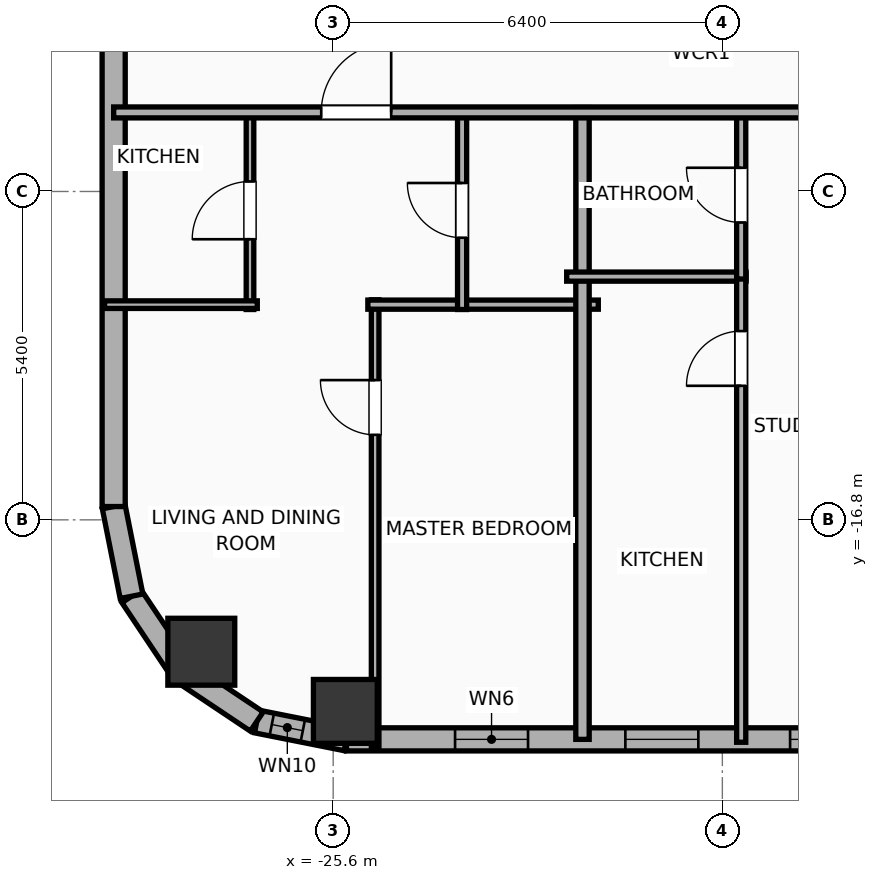
"""IFC4 building model, lengths in metres.
Left out: names, types, materials, properties, quantities, classifications, styles, units other than length and angle.
Written with IfcOpenShell. Run it as: python <this file> out.ifc"""

import sys

from ifc_helpers import new_model, si_unit, direction, frame, frame_2d, origin, origin_2d, place, context, subcontext, project, spatial, rectangle, hollow_rectangle, hollow_circle, extrude, element, fill, save


model = new_model("IFC4")
c1 = context("Model", 3, precision=1e-05, world=origin(), true_north=direction((0.0, 1.0)))
c2 = subcontext(c1, "Body", "Model", "MODEL_VIEW")
j1 = project(units=[si_unit("LENGTHUNIT", "METRE"), si_unit("PLANEANGLEUNIT", "RADIAN")], contexts=[c1])
p1 = place(None, origin())
s1 = spatial("IfcSite", under=j1, at=p1, CompositionType="ELEMENT")
p2 = place(p1, origin())
s2 = spatial("IfcBuilding", under=s1, at=p2, CompositionType="ELEMENT")
p3 = place(p2, frame((0.0, 0.0, 128.7)))
s3 = spatial("IfcBuildingStorey", under=s2, at=p3, CompositionType="ELEMENT", Elevation=128.7)
p4 = place(p3, frame((-25.4, -19.95, 0.0), z_axis=(0.0, 0.0, 1.0), x_axis=(1.0, 0.0, 0.0)))
e1 = element("IfcColumn", 1, at=p4, inside=s3, PredefinedType="COLUMN", context=c2, shape_type="SweptSolid", body=[
    extrude(hollow_rectangle(XDim=1.05, YDim=1.05, WallThickness=0.036, at=origin_2d()), origin(), (0.0, 0.0, 1.0), 3.9),
])
p5 = place(p3, frame((-27.769, -18.969, 0.0), z_axis=(0.0, 0.0, 1.0), x_axis=(1.0, 0.0, 0.0)))
e2 = element("IfcColumn", 2, at=p5, inside=s3, PredefinedType="COLUMN", context=c2, shape_type="SweptSolid", body=[
    extrude(hollow_circle(Radius=0.55, WallThickness=0.036, at=origin_2d()), origin(), (0.0, 0.0, 1.0), 3.9),
])
p6 = place(p3, frame((29.381, -20.41, 0.0), z_axis=(0.0, 0.0, 1.0), x_axis=(-1.0, 0.0, 0.0)))
e3 = element("IfcWall", 3, at=p6, inside=s3, PredefinedType="ELEMENTEDWALL", context=c2, shape_type="SweptSolid", body=[
    extrude(rectangle(XDim=54.763, YDim=0.38, at=frame_2d((27.381, 0.0))), origin(), (0.0, 0.0, 1.0), 3.65),
])
p7 = place(p6, frame((45.067, 0.0, 0.75)))
e4 = element("IfcOpeningElement", 4, at=p7, cuts=e3, PredefinedType="OPENING", context=c2, shape_type="SweptSolid", body=[
    extrude(rectangle(XDim=2.4, YDim=2.1, at=frame_2d((1.2, 1.05))), frame((0.0, 0.2, 0.0), z_axis=(0.0, -1.0, 0.0), x_axis=(1.0, 0.0, 0.0)), (0.0, 0.0, 1.0), 0.4),
])
p8 = place(p6, frame((51.777, 0.0, 0.75)))
e5 = element("IfcOpeningElement", 5, at=p8, cuts=e3, PredefinedType="OPENING", context=c2, shape_type="SweptSolid", body=[
    extrude(rectangle(XDim=1.2, YDim=2.05, at=frame_2d((0.6, 1.025))), frame((0.0, 0.2, 0.0), z_axis=(0.0, -1.0, 0.0), x_axis=(1.0, 0.0, 0.0)), (0.0, 0.0, 1.0), 0.4),
])
p9 = place(p6, frame((48.976, 0.0, 0.75)))
e6 = element("IfcOpeningElement", 6, at=p9, cuts=e3, PredefinedType="OPENING", context=c2, shape_type="SweptSolid", body=[
    extrude(rectangle(XDim=1.2, YDim=2.05, at=frame_2d((0.6, 1.025))), frame((0.0, 0.2, 0.0), z_axis=(0.0, -1.0, 0.0), x_axis=(1.0, 0.0, 0.0)), (0.0, 0.0, 1.0), 0.4),
])
p10 = place(p6, frame((40.531, 0.0, 0.75)))
e7 = element("IfcOpeningElement", 7, at=p10, cuts=e3, PredefinedType="OPENING", context=c2, shape_type="SweptSolid", body=[
    extrude(rectangle(XDim=1.2, YDim=2.05, at=frame_2d((0.6, 1.025))), frame((0.0, 0.2, 0.0), z_axis=(0.0, -1.0, 0.0), x_axis=(1.0, 0.0, 0.0)), (0.0, 0.0, 1.0), 0.4),
])
p11 = place(p6, frame((33.686, 0.0, 0.75)))
e8 = element("IfcOpeningElement", 8, at=p11, cuts=e3, PredefinedType="OPENING", context=c2, shape_type="SweptSolid", body=[
    extrude(rectangle(XDim=1.2, YDim=2.05, at=frame_2d((0.6, 1.025))), frame((0.0, 0.2, 0.0), z_axis=(0.0, -1.0, 0.0), x_axis=(1.0, 0.0, 0.0)), (0.0, 0.0, 1.0), 0.4),
])
p12 = place(p6, frame((35.976, 0.0, 0.75)))
e9 = element("IfcOpeningElement", 9, at=p12, cuts=e3, PredefinedType="OPENING", context=c2, shape_type="SweptSolid", body=[
    extrude(rectangle(XDim=1.2, YDim=2.05, at=frame_2d((0.6, 1.025))), frame((0.0, 0.2, 0.0), z_axis=(0.0, -1.0, 0.0), x_axis=(1.0, 0.0, 0.0)), (0.0, 0.0, 1.0), 0.4),
])
p13 = place(p6, frame((28.805, 0.0, 0.75)))
e10 = element("IfcOpeningElement", 10, at=p13, cuts=e3, PredefinedType="OPENING", context=c2, shape_type="SweptSolid", body=[
    extrude(rectangle(XDim=1.2, YDim=2.05, at=frame_2d((0.6, 1.025))), frame((0.0, 0.2, 0.0), z_axis=(0.0, -1.0, 0.0), x_axis=(1.0, 0.0, 0.0)), (0.0, 0.0, 1.0), 0.4),
])
p14 = place(p6, frame((25.555, 0.0, 0.75)))
e11 = element("IfcOpeningElement", 11, at=p14, cuts=e3, PredefinedType="OPENING", context=c2, shape_type="SweptSolid", body=[
    extrude(rectangle(XDim=1.2, YDim=2.05, at=frame_2d((0.6, 1.025))), frame((0.0, 0.2, 0.0), z_axis=(0.0, -1.0, 0.0), x_axis=(1.0, 0.0, 0.0)), (0.0, 0.0, 1.0), 0.4),
])
p15 = place(p6, frame((19.951, 0.0, 0.75)))
e12 = element("IfcOpeningElement", 12, at=p15, cuts=e3, PredefinedType="OPENING", context=c2, shape_type="SweptSolid", body=[
    extrude(rectangle(XDim=1.2, YDim=2.05, at=frame_2d((0.6, 1.025))), frame((0.0, 0.2, 0.0), z_axis=(0.0, -1.0, 0.0), x_axis=(1.0, 0.0, 0.0)), (0.0, 0.0, 1.0), 0.4),
])
p16 = place(p6, frame((15.836, 0.0, 0.75)))
e13 = element("IfcOpeningElement", 13, at=p16, cuts=e3, PredefinedType="OPENING", context=c2, shape_type="SweptSolid", body=[
    extrude(rectangle(XDim=1.2, YDim=2.05, at=frame_2d((0.6, 1.025))), frame((0.0, 0.2, 0.0), z_axis=(0.0, -1.0, 0.0), x_axis=(1.0, 0.0, 0.0)), (0.0, 0.0, 1.0), 0.4),
])
p17 = place(p6, frame((12.586, 0.0, 0.75)))
e14 = element("IfcOpeningElement", 14, at=p17, cuts=e3, PredefinedType="OPENING", context=c2, shape_type="SweptSolid", body=[
    extrude(rectangle(XDim=1.2, YDim=2.05, at=frame_2d((0.6, 1.025))), frame((0.0, 0.2, 0.0), z_axis=(0.0, -1.0, 0.0), x_axis=(1.0, 0.0, 0.0)), (0.0, 0.0, 1.0), 0.4),
])
p18 = place(p6, frame((9.011, 0.0, 0.75)))
e15 = element("IfcOpeningElement", 15, at=p18, cuts=e3, PredefinedType="OPENING", context=c2, shape_type="SweptSolid", body=[
    extrude(rectangle(XDim=1.2, YDim=2.05, at=frame_2d((0.6, 1.025))), frame((0.0, 0.2, 0.0), z_axis=(0.0, -1.0, 0.0), x_axis=(1.0, 0.0, 0.0)), (0.0, 0.0, 1.0), 0.4),
])
p19 = place(p6, frame((6.001, 0.0, 0.75)))
e16 = element("IfcOpeningElement", 16, at=p19, cuts=e3, PredefinedType="OPENING", context=c2, shape_type="SweptSolid", body=[
    extrude(rectangle(XDim=1.2, YDim=2.05, at=frame_2d((0.6, 1.025))), frame((0.0, 0.2, 0.0), z_axis=(0.0, -1.0, 0.0), x_axis=(1.0, 0.0, 0.0)), (0.0, 0.0, 1.0), 0.4),
])
p20 = place(p6, frame((2.536, 0.0, 0.75)))
e17 = element("IfcOpeningElement", 17, at=p20, cuts=e3, PredefinedType="OPENING", context=c2, shape_type="SweptSolid", body=[
    extrude(rectangle(XDim=1.2, YDim=2.05, at=frame_2d((0.6, 1.025))), frame((0.0, 0.2, 0.0), z_axis=(0.0, -1.0, 0.0), x_axis=(1.0, 0.0, 0.0)), (0.0, 0.0, 1.0), 0.4),
])
p21 = place(p3, frame((-25.381, -20.41, 0.0), z_axis=(0.0, 0.0, 1.0), x_axis=(-0.980786132421, 0.195086038585, 0.0)))
e18 = element("IfcWall", 18, at=p21, inside=s3, PredefinedType="ELEMENTEDWALL", context=c2, shape_type="SweptSolid", body=[
    extrude(rectangle(XDim=1.504, YDim=0.38, at=frame_2d((0.752, 0.0))), origin(), (0.0, 0.0, 1.0), 3.65),
])
p22 = place(p21, frame((0.732, 0.0, 0.75)))
e19 = element("IfcOpeningElement", 19, at=p22, cuts=e18, PredefinedType="OPENING", context=c2, shape_type="SweptSolid", body=[
    extrude(rectangle(XDim=0.52, YDim=2.05, at=frame_2d((0.26, 1.025))), frame((0.0, 0.2, 0.0), z_axis=(0.0, -1.0, 0.0), x_axis=(1.0, 0.0, 0.0)), (0.0, 0.0, 1.0), 0.4),
])
p23 = place(p3, frame((-26.857, -20.116, 0.0), z_axis=(0.0, 0.0, 1.0), x_axis=(-0.831468045563, 0.555572577804, 0.0)))
e20 = element("IfcWall", 20, at=p23, inside=s3, PredefinedType="ELEMENTEDWALL", context=c2, shape_type="SweptSolid", body=[
    extrude(rectangle(XDim=1.485, YDim=0.38, at=frame_2d((0.742, 0.0))), origin(), (0.0, 0.0, 1.0), 3.65),
])
p24 = place(p3, frame((-28.091, -19.292, 0.0), z_axis=(0.0, 0.0, 1.0), x_axis=(-0.555610286119, 0.831442848281, 0.0)))
e21 = element("IfcWall", 21, at=p24, inside=s3, PredefinedType="ELEMENTEDWALL", context=c2, shape_type="SweptSolid", body=[
    extrude(rectangle(XDim=1.485, YDim=0.38, at=frame_2d((0.743, 0.0))), origin(), (0.0, 0.0, 1.0), 3.65),
])
p25 = place(p3, frame((-28.917, -18.057, 0.0), z_axis=(0.0, 0.0, 1.0), x_axis=(-0.195086038585, 0.980786132421, 0.0)))
e22 = element("IfcWall", 22, at=p25, inside=s3, PredefinedType="ELEMENTEDWALL", context=c2, shape_type="SweptSolid", body=[
    extrude(rectangle(XDim=1.504, YDim=0.38, at=frame_2d((0.752, 0.0))), origin(), (0.0, 0.0, 1.0), 3.65),
])
p26 = place(p3, frame((-29.21, -16.581, 0.0), z_axis=(0.0, 0.0, 1.0), x_axis=(0.0, 1.0, 0.0)))
e23 = element("IfcWall", 23, at=p26, inside=s3, PredefinedType="ELEMENTEDWALL", context=c2, shape_type="SweptSolid", body=[
    extrude(rectangle(XDim=34.363, YDim=0.38, at=frame_2d((17.181, 0.0))), origin(), (0.0, 0.0, 1.0), 3.65),
])
p27 = place(p26, frame((31.087, 0.0, 0.75)))
e24 = element("IfcOpeningElement", 24, at=p27, cuts=e23, PredefinedType="OPENING", context=c2, shape_type="SweptSolid", body=[
    extrude(rectangle(XDim=1.2, YDim=2.05, at=frame_2d((0.6, 1.025))), frame((0.0, 0.2, 0.0), z_axis=(0.0, -1.0, 0.0), x_axis=(1.0, 0.0, 0.0)), (0.0, 0.0, 1.0), 0.4),
])
p28 = place(p26, frame((20.326, 0.0, 0.75)))
e25 = element("IfcOpeningElement", 25, at=p28, cuts=e23, PredefinedType="OPENING", context=c2, shape_type="SweptSolid", body=[
    extrude(rectangle(XDim=1.2, YDim=2.05, at=frame_2d((0.6, 1.025))), frame((0.0, 0.2, 0.0), z_axis=(0.0, -1.0, 0.0), x_axis=(1.0, 0.0, 0.0)), (0.0, 0.0, 1.0), 0.4),
])
p29 = place(p26, frame((11.776, 0.0, 0.75)))
e26 = element("IfcOpeningElement", 26, at=p29, cuts=e23, PredefinedType="OPENING", context=c2, shape_type="SweptSolid", body=[
    extrude(rectangle(XDim=1.2, YDim=2.05, at=frame_2d((0.6, 1.025))), frame((0.0, 0.2, 0.0), z_axis=(0.0, -1.0, 0.0), x_axis=(1.0, 0.0, 0.0)), (0.0, 0.0, 1.0), 0.4),
])
p30 = place(p3, frame((-24.91, -20.56, 0.0), z_axis=(0.0, 0.0, 1.0), x_axis=(0.0, 1.0, 0.0)))
e27 = element("IfcWall", 27, at=p30, inside=s3, PredefinedType="PARTITIONING", context=c2, shape_type="SweptSolid", body=[
    extrude(rectangle(XDim=7.379, YDim=0.125, at=frame_2d((3.689, 0.0))), origin(), (0.0, 0.0, 1.0), 3.65),
])
p31 = place(p30, frame((5.158, 0.0, 0.0)))
e28 = element("IfcOpeningElement", 28, at=p31, cuts=e27, PredefinedType="OPENING", context=c2, shape_type="SweptSolid", body=[
    extrude(rectangle(XDim=0.9, YDim=2.05, at=frame_2d((0.45, 1.025))), frame((0.0, 0.073, 0.0), z_axis=(0.0, -1.0, 0.0), x_axis=(1.0, 0.0, 0.0)), (0.0, 0.0, 1.0), 0.145),
])
p32 = place(p3, frame((-25.03, -13.261, 0.0), z_axis=(0.0, 0.0, 1.0), x_axis=(1.0, 0.0, 0.0)))
e29 = element("IfcWall", 29, at=p32, inside=s3, PredefinedType="PLUMBINGWALL", context=c2, shape_type="SweptSolid", body=[
    extrude(rectangle(XDim=3.79, YDim=0.15, at=frame_2d((1.895, 0.0))), origin(), (0.0, 0.0, 1.0), 3.65),
])
p33 = place(p3, frame((-26.968, -13.341, 0.0), z_axis=(0.0, 0.0, 1.0), x_axis=(0.0, 1.0, 0.0)))
e30 = element("IfcWall", 30, at=p33, inside=s3, PredefinedType="PARTITIONING", context=c2, shape_type="SweptSolid", body=[
    extrude(rectangle(XDim=3.261, YDim=0.125, at=frame_2d((1.63, 0.0))), origin(), (0.0, 0.0, 1.0), 3.65),
])
p34 = place(p33, frame((1.156, 0.0, 0.0)))
e31 = element("IfcOpeningElement", 31, at=p34, cuts=e30, PredefinedType="OPENING", context=c2, shape_type="SweptSolid", body=[
    extrude(rectangle(XDim=0.95, YDim=2.05, at=frame_2d((0.475, 1.025))), frame((0.0, 0.073, 0.0), z_axis=(0.0, -1.0, 0.0), x_axis=(1.0, 0.0, 0.0)), (0.0, 0.0, 1.0), 0.145),
])
p35 = place(p3, frame((-29.36, -13.261, 0.0), z_axis=(0.0, 0.0, 1.0), x_axis=(1.0, 0.0, 0.0)))
e32 = element("IfcWall", 32, at=p35, inside=s3, PredefinedType="PARTITIONING", context=c2, shape_type="SweptSolid", body=[
    extrude(rectangle(XDim=2.512, YDim=0.125, at=frame_2d((1.256, 0.0))), origin(), (0.0, 0.0, 1.0), 3.65),
])
p36 = place(p3, frame((-23.48, -13.341, 0.0), z_axis=(0.0, 0.0, 1.0), x_axis=(0.0, 1.0, 0.0)))
e33 = element("IfcWall", 33, at=p36, inside=s3, PredefinedType="PLUMBINGWALL", context=c2, shape_type="SweptSolid", body=[
    extrude(rectangle(XDim=3.261, YDim=0.15, at=frame_2d((1.63, 0.0))), origin(), (0.0, 0.0, 1.0), 3.65),
])
p37 = place(p36, frame((1.18, 0.0, 0.0)))
e34 = element("IfcOpeningElement", 34, at=p37, cuts=e33, PredefinedType="OPENING", context=c2, shape_type="SweptSolid", body=[
    extrude(rectangle(XDim=0.9, YDim=2.05, at=frame_2d((0.45, 1.025))), frame((0.0, 0.085, 0.0), z_axis=(0.0, -1.0, 0.0), x_axis=(1.0, 0.0, 0.0)), (0.0, 0.0, 1.0), 0.17),
])
p38 = place(p3, frame((-21.5, -20.41, 0.0), z_axis=(0.0, 0.0, 1.0), x_axis=(0.0, 1.0, 0.0)))
e35 = element("IfcWall", 35, at=p38, inside=s3, PredefinedType="PARTITIONING", context=c2, shape_type="SweptSolid", body=[
    extrude(rectangle(XDim=10.39, YDim=0.22, at=frame_2d((5.195, 0.0))), origin(), (0.0, 0.0, 1.0), 3.65),
])
p39 = place(p3, frame((-21.76, -12.8, 0.0), z_axis=(0.0, 0.0, 1.0), x_axis=(1.0, 0.0, 0.0)))
e36 = element("IfcWall", 36, at=p39, inside=s3, PredefinedType="PLUMBINGWALL", context=c2, shape_type="SweptSolid", body=[
    extrude(rectangle(XDim=2.95, YDim=0.15, at=frame_2d((1.475, 0.0))), origin(), (0.0, 0.0, 1.0), 3.65),
])
p40 = place(p3, frame((-18.89, -20.458, 0.0), z_axis=(0.0, 0.0, 1.0), x_axis=(0.0, 1.0, 0.0)))
e37 = element("IfcWall", 37, at=p40, inside=s3, PredefinedType="PLUMBINGWALL", context=c2, shape_type="SweptSolid", body=[
    extrude(rectangle(XDim=7.698, YDim=0.15, at=frame_2d((3.849, 0.0))), origin(), (0.0, 0.0, 1.0), 3.65),
])
p41 = place(p40, frame((5.862, 0.0, 0.0)))
e38 = element("IfcOpeningElement", 38, at=p41, cuts=e37, PredefinedType="OPENING", context=c2, shape_type="SweptSolid", body=[
    extrude(rectangle(XDim=0.9, YDim=2.05, at=frame_2d((0.45, 1.025))), frame((0.0, 0.085, 0.0), z_axis=(0.0, -1.0, 0.0), x_axis=(1.0, 0.0, 0.0)), (0.0, 0.0, 1.0), 0.17),
])
p42 = place(p3, frame((-18.89, -12.84, 0.0), z_axis=(0.0, 0.0, 1.0), x_axis=(0.0, 1.0, 0.0)))
e39 = element("IfcWall", 39, at=p42, inside=s3, PredefinedType="PLUMBINGWALL", context=c2, shape_type="SweptSolid", body=[
    extrude(rectangle(XDim=2.76, YDim=0.15, at=frame_2d((1.38, 0.0))), origin(), (0.0, 0.0, 1.0), 3.65),
])
p43 = place(p42, frame((0.93, 0.0, 0.0)))
e40 = element("IfcOpeningElement", 40, at=p43, cuts=e39, PredefinedType="OPENING", context=c2, shape_type="SweptSolid", body=[
    extrude(rectangle(XDim=0.9, YDim=2.05, at=frame_2d((0.45, 1.025))), frame((0.0, 0.085, 0.0), z_axis=(0.0, -1.0, 0.0), x_axis=(1.0, 0.0, 0.0)), (0.0, 0.0, 1.0), 0.17),
])
p44 = place(p3, frame((-29.21, -10.1, 0.0), z_axis=(0.0, 0.0, 1.0), x_axis=(1.0, 0.0, 0.0)))
e41 = element("IfcWall", 41, at=p44, inside=s3, PredefinedType="PARTITIONING", context=c2, shape_type="SweptSolid", body=[
    extrude(rectangle(XDim=62.42, YDim=0.18, at=frame_2d((31.21, 0.0))), origin(), (0.0, 0.0, 1.0), 3.65),
])
p45 = place(p44, frame((3.414, 0.0, 0.0)))
e42 = element("IfcOpeningElement", 42, at=p45, cuts=e41, PredefinedType="OPENING", context=c2, shape_type="SweptSolid", body=[
    extrude(rectangle(XDim=1.15, YDim=2.05, at=frame_2d((0.575, 1.025))), frame((0.0, 0.1, 0.0), z_axis=(0.0, -1.0, 0.0), x_axis=(1.0, 0.0, 0.0)), (0.0, 0.0, 1.0), 0.2),
])
p46 = place(p44, frame((11.659, 0.0, 0.0)))
e43 = element("IfcOpeningElement", 43, at=p46, cuts=e41, PredefinedType="OPENING", context=c2, shape_type="SweptSolid", body=[
    extrude(rectangle(XDim=1.15, YDim=2.05, at=frame_2d((0.575, 1.025))), frame((0.0, 0.1, 0.0), z_axis=(0.0, -1.0, 0.0), x_axis=(1.0, 0.0, 0.0)), (0.0, 0.0, 1.0), 0.2),
])
p47 = place(p44, frame((17.14, 0.0, 0.0)))
e44 = element("IfcOpeningElement", 44, at=p47, cuts=e41, PredefinedType="OPENING", context=c2, shape_type="SweptSolid", body=[
    extrude(rectangle(XDim=0.9, YDim=2.05, at=frame_2d((0.45, 1.025))), frame((0.0, 0.1, 0.0), z_axis=(0.0, -1.0, 0.0), x_axis=(1.0, 0.0, 0.0)), (0.0, 0.0, 1.0), 0.2),
])
p48 = place(p44, frame((24.661, 0.0, 0.0)))
e45 = element("IfcOpeningElement", 45, at=p48, cuts=e41, PredefinedType="OPENING", context=c2, shape_type="SweptSolid", body=[
    extrude(rectangle(XDim=1.15, YDim=2.05, at=frame_2d((0.575, 1.025))), frame((0.0, 0.1, 0.0), z_axis=(0.0, -1.0, 0.0), x_axis=(1.0, 0.0, 0.0)), (0.0, 0.0, 1.0), 0.2),
])
p49 = place(p44, frame((28.644, 0.0, 0.0)))
e46 = element("IfcOpeningElement", 46, at=p49, cuts=e41, PredefinedType="OPENING", context=c2, shape_type="SweptSolid", body=[
    extrude(rectangle(XDim=1.15, YDim=2.05, at=frame_2d((0.575, 1.025))), frame((0.0, 0.1, 0.0), z_axis=(0.0, -1.0, 0.0), x_axis=(1.0, 0.0, 0.0)), (0.0, 0.0, 1.0), 0.2),
])
p50 = place(p44, frame((36.64, 0.0, 0.0)))
e47 = element("IfcOpeningElement", 47, at=p50, cuts=e41, PredefinedType="OPENING", context=c2, shape_type="SweptSolid", body=[
    extrude(rectangle(XDim=0.9, YDim=2.05, at=frame_2d((0.45, 1.025))), frame((0.0, 0.1, 0.0), z_axis=(0.0, -1.0, 0.0), x_axis=(1.0, 0.0, 0.0)), (0.0, 0.0, 1.0), 0.2),
])
p51 = place(p44, frame((41.608, 0.0, 0.0)))
e48 = element("IfcOpeningElement", 48, at=p51, cuts=e41, PredefinedType="OPENING", context=c2, shape_type="SweptSolid", body=[
    extrude(rectangle(XDim=1.15, YDim=2.05, at=frame_2d((0.575, 1.025))), frame((0.0, 0.1, 0.0), z_axis=(0.0, -1.0, 0.0), x_axis=(1.0, 0.0, 0.0)), (0.0, 0.0, 1.0), 0.2),
])
p52 = place(p44, frame((48.194, 0.0, 0.0)))
e49 = element("IfcOpeningElement", 49, at=p52, cuts=e41, PredefinedType="OPENING", context=c2, shape_type="SweptSolid", body=[
    extrude(rectangle(XDim=1.15, YDim=2.05, at=frame_2d((0.575, 1.025))), frame((0.0, 0.1, 0.0), z_axis=(0.0, -1.0, 0.0), x_axis=(1.0, 0.0, 0.0)), (0.0, 0.0, 1.0), 0.2),
])
p53 = place(p44, frame((57.525, 0.0, 0.0)))
e50 = element("IfcOpeningElement", 50, at=p53, cuts=e41, PredefinedType="OPENING", context=c2, shape_type="SweptSolid", body=[
    extrude(rectangle(XDim=1.15, YDim=2.05, at=frame_2d((0.575, 1.025))), frame((0.0, 0.1, 0.0), z_axis=(0.0, -1.0, 0.0), x_axis=(1.0, 0.0, 0.0)), (0.0, 0.0, 1.0), 0.2),
])
p54 = place(p7, origin())
e51 = element("IfcWindow", 51, at=p54, inside=s3, PartitioningType="SINGLE_PANEL", PredefinedType="WINDOW", context=c2, shape_type="SweptSolid", body=[
    extrude(rectangle(XDim=2.4, YDim=2.1, at=frame_2d((1.2, 1.05))), frame((0.0, 0.03, 0.0), z_axis=(0.0, -1.0, 0.0), x_axis=(1.0, 0.0, 0.0)), (0.0, 0.0, 1.0), 0.06),
])
fill(e4, e51)
p55 = place(p22, origin())
e52 = element("IfcWindow", 52, at=p55, inside=s3, PartitioningType="SINGLE_PANEL", PredefinedType="WINDOW", context=c2, shape_type="SweptSolid", body=[
    extrude(rectangle(XDim=0.52, YDim=2.05, at=frame_2d((0.26, 1.025))), frame((0.0, 0.03, 0.0), z_axis=(0.0, -1.0, 0.0), x_axis=(1.0, 0.0, 0.0)), (0.0, 0.0, 1.0), 0.06),
])
fill(e19, e52)
p56 = place(p8, origin())
e53 = element("IfcWindow", 53, at=p56, inside=s3, PartitioningType="SINGLE_PANEL", PredefinedType="WINDOW", context=c2, shape_type="SweptSolid", body=[
    extrude(rectangle(XDim=1.2, YDim=2.05, at=frame_2d((0.6, 1.025))), frame((0.0, 0.03, 0.0), z_axis=(0.0, -1.0, 0.0), x_axis=(1.0, 0.0, 0.0)), (0.0, 0.0, 1.0), 0.06),
])
fill(e5, e53)
p57 = place(p9, origin())
e54 = element("IfcWindow", 54, at=p57, inside=s3, PartitioningType="SINGLE_PANEL", PredefinedType="WINDOW", context=c2, shape_type="SweptSolid", body=[
    extrude(rectangle(XDim=1.2, YDim=2.05, at=frame_2d((0.6, 1.025))), frame((0.0, 0.03, 0.0), z_axis=(0.0, -1.0, 0.0), x_axis=(1.0, 0.0, 0.0)), (0.0, 0.0, 1.0), 0.06),
])
fill(e6, e54)
p58 = place(p31, origin())
e55 = element("IfcDoor", 55, at=p58, inside=s3, OperationType="SINGLE_SWING_RIGHT", PredefinedType="DOOR", context=c2, shape_type="SweptSolid", body=[
    extrude(rectangle(XDim=0.9, YDim=2.05, at=frame_2d((0.45, 1.025))), frame((0.0, 0.025, 0.0), z_axis=(0.0, -1.0, 0.0), x_axis=(1.0, 0.0, 0.0)), (0.0, 0.0, 1.0), 0.05),
])
fill(e28, e55)
p59 = place(p34, origin())
e56 = element("IfcDoor", 56, at=p59, inside=s3, OperationType="SINGLE_SWING_LEFT", PredefinedType="DOOR", context=c2, shape_type="SweptSolid", body=[
    extrude(rectangle(XDim=0.95, YDim=2.05, at=frame_2d((0.475, 1.025))), frame((0.0, 0.025, 0.0), z_axis=(0.0, -1.0, 0.0), x_axis=(1.0, 0.0, 0.0)), (0.0, 0.0, 1.0), 0.05),
])
fill(e31, e56)
p60 = place(p37, origin())
e57 = element("IfcDoor", 57, at=p60, inside=s3, OperationType="SINGLE_SWING_RIGHT", PredefinedType="DOOR", context=c2, shape_type="SweptSolid", body=[
    extrude(rectangle(XDim=0.9, YDim=2.05, at=frame_2d((0.45, 1.025))), frame((0.0, 0.025, 0.0), z_axis=(0.0, -1.0, 0.0), x_axis=(1.0, 0.0, 0.0)), (0.0, 0.0, 1.0), 0.05),
])
fill(e34, e57)
p61 = place(p41, origin())
e58 = element("IfcDoor", 58, at=p61, inside=s3, OperationType="SINGLE_SWING_LEFT", PredefinedType="DOOR", context=c2, shape_type="SweptSolid", body=[
    extrude(rectangle(XDim=0.9, YDim=2.05, at=frame_2d((0.45, 1.025))), frame((0.0, 0.025, 0.0), z_axis=(0.0, -1.0, 0.0), x_axis=(1.0, 0.0, 0.0)), (0.0, 0.0, 1.0), 0.05),
])
fill(e38, e58)
p62 = place(p43, origin())
e59 = element("IfcDoor", 59, at=p62, inside=s3, OperationType="SINGLE_SWING_RIGHT", PredefinedType="DOOR", context=c2, shape_type="SweptSolid", body=[
    extrude(rectangle(XDim=0.9, YDim=2.05, at=frame_2d((0.45, 1.025))), frame((0.0, 0.025, 0.0), z_axis=(0.0, -1.0, 0.0), x_axis=(1.0, 0.0, 0.0)), (0.0, 0.0, 1.0), 0.05),
])
fill(e40, e59)
p63 = place(p45, origin())
e60 = element("IfcDoor", 60, at=p63, inside=s3, OperationType="SINGLE_SWING_RIGHT", PredefinedType="DOOR", context=c2, shape_type="SweptSolid", body=[
    extrude(rectangle(XDim=1.15, YDim=2.05, at=frame_2d((0.575, 1.025))), frame((0.0, 0.025, 0.0), z_axis=(0.0, -1.0, 0.0), x_axis=(1.0, 0.0, 0.0)), (0.0, 0.0, 1.0), 0.05),
])
fill(e42, e60)
save(model, sys.argv[1])
